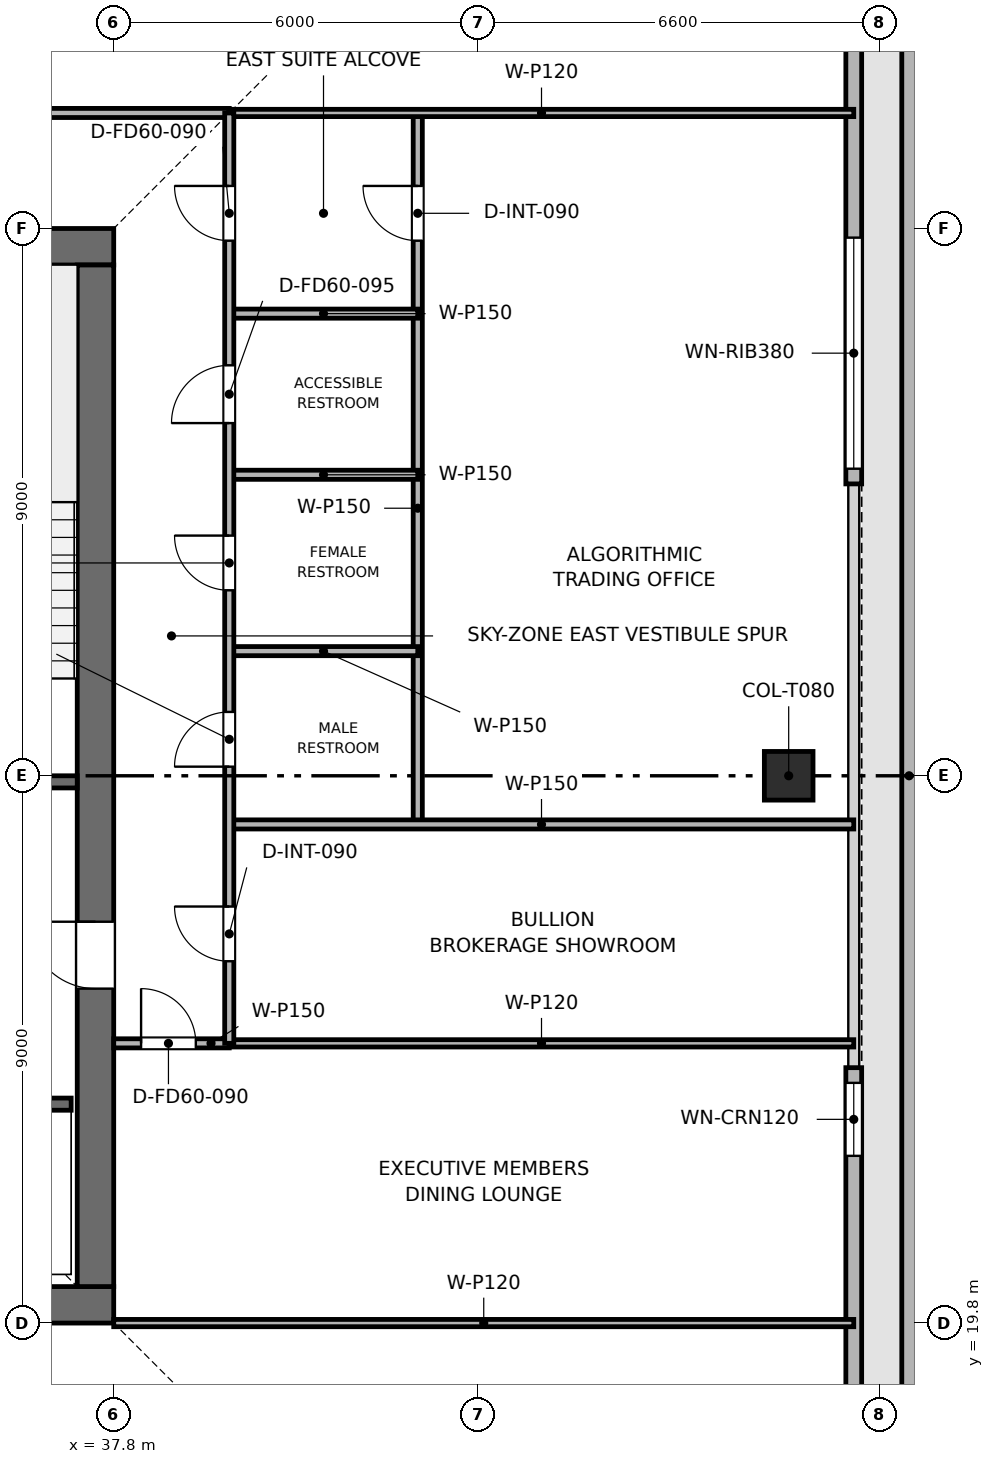
"""IFC4 building model, lengths in metres.
Left out: names, types, materials, properties, quantities, classifications, styles, units other than length and angle.
Written with IfcOpenShell. Run it as: python <this file> out.ifc"""

import sys

from ifc_helpers import new_model, si_unit, direction, frame, frame_2d, origin, origin_2d, place, context, subcontext, project, spatial, rectangle, extrude, element, fill, save


model = new_model("IFC4")
c1 = context("Model", 3, precision=1e-05, world=origin(), true_north=direction((0.0, 1.0)))
c2 = subcontext(c1, "Body", "Model", "MODEL_VIEW")
j1 = project(units=[si_unit("LENGTHUNIT", "METRE"), si_unit("PLANEANGLEUNIT", "RADIAN")], contexts=[c1])
p1 = place(None, origin())
s1 = spatial("IfcSite", under=j1, at=p1, CompositionType="ELEMENT")
p2 = place(p1, origin())
s2 = spatial("IfcBuilding", under=s1, at=p2, CompositionType="ELEMENT")
p3 = place(p2, frame((0.0, 0.0, 344.25)))
s3 = spatial("IfcBuildingStorey", under=s2, at=p3, CompositionType="ELEMENT", Elevation=344.25)
p4 = place(p3, frame((19.8, 20.1, 0.0), z_axis=(0.0, 0.0, 1.0), x_axis=(1.0, 0.0, 0.0)))
e1 = element("IfcWall", 1, at=p4, inside=s3, PredefinedType="SHEAR", context=c2, shape_type="SweptSolid", body=[
    extrude(rectangle(XDim=18.0, YDim=0.6, at=frame_2d((9.0, 0.0))), origin(), (0.0, 0.0, 1.0), 3.75),
])
p5 = place(p3, frame((19.8, 37.5, 0.0), z_axis=(0.0, 0.0, 1.0), x_axis=(1.0, 0.0, 0.0)))
e2 = element("IfcWall", 2, at=p5, inside=s3, PredefinedType="SHEAR", context=c2, shape_type="SweptSolid", body=[
    extrude(rectangle(XDim=18.0, YDim=0.6, at=frame_2d((9.0, 0.0))), origin(), (0.0, 0.0, 1.0), 3.75),
])
p6 = place(p5, frame((7.05, 0.0, 0.0)))
e3 = element("IfcOpeningElement", 3, at=p6, cuts=e2, PredefinedType="OPENING", context=c2, shape_type="SweptSolid", body=[
    extrude(rectangle(XDim=1.1, YDim=2.15, at=frame_2d((0.55, 1.075))), frame((0.0, 0.31, 0.0), z_axis=(0.0, -1.0, 0.0), x_axis=(1.0, 0.0, 0.0)), (0.0, 0.0, 1.0), 0.62),
])
p7 = place(p3, frame((37.5, 20.4, 0.0), z_axis=(0.0, 0.0, 1.0), x_axis=(0.0, 1.0, 0.0)))
e4 = element("IfcWall", 4, at=p7, inside=s3, PredefinedType="SHEAR", context=c2, shape_type="SweptSolid", body=[
    extrude(rectangle(XDim=16.8, YDim=0.6, at=frame_2d((8.4, 0.0))), origin(), (0.0, 0.0, 1.0), 3.75),
])
p8 = place(p7, frame((4.9, 0.0, 0.0)))
e5 = element("IfcOpeningElement", 5, at=p8, cuts=e4, PredefinedType="OPENING", context=c2, shape_type="SweptSolid", body=[
    extrude(rectangle(XDim=1.1, YDim=2.15, at=frame_2d((0.55, 1.075))), frame((0.0, 0.31, 0.0), z_axis=(0.0, -1.0, 0.0), x_axis=(1.0, 0.0, 0.0)), (0.0, 0.0, 1.0), 0.62),
])
p9 = place(p3, frame((48.9, 28.8, 0.003), z_axis=(0.0, 0.0, 1.0), x_axis=(1.0, 0.0, 0.0)))
e6 = element("IfcColumn", 6, at=p9, inside=s3, PredefinedType="COLUMN", context=c2, shape_type="SweptSolid", body=[
    extrude(rectangle(XDim=0.8, YDim=0.8, at=origin_2d()), origin(), (0.0, 0.0, 1.0), 3.504),
])
p10 = place(p3, frame((50.88, 12.855, 0.0), z_axis=(0.0, 0.0, 1.0), x_axis=(0.0, 1.0, 0.0)))
e7 = element("IfcWall", 7, at=p10, inside=s3, PredefinedType="PARAPET", context=c2, shape_type="SweptSolid", body=[
    extrude(rectangle(XDim=31.89, YDim=0.24, at=frame_2d((15.945, 0.0))), origin(), (0.0, 0.0, 1.0), 1.2),
])
p11 = place(p3, frame((49.97, 44.3, 0.0), z_axis=(0.0, 0.0, 1.0), x_axis=(0.0, -1.0, 0.0)))
e8 = element("IfcWall", 8, at=p11, inside=s3, PredefinedType="SOLIDWALL", context=c2, shape_type="SweptSolid", body=[
    extrude(rectangle(XDim=10.7, YDim=0.26, at=frame_2d((5.35, 0.0))), origin(), (0.0, 0.0, 1.0), 3.51),
])
p12 = place(p11, frame((6.65, 0.0, 0.9)))
e9 = element("IfcOpeningElement", 9, at=p12, cuts=e8, PredefinedType="OPENING", context=c2, shape_type="SweptSolid", body=[
    extrude(rectangle(XDim=3.8, YDim=1.9, at=frame_2d((1.9, 0.95))), frame((0.0, 0.14, 0.0), z_axis=(0.0, -1.0, 0.0), x_axis=(1.0, 0.0, 0.0)), (0.0, 0.0, 1.0), 0.28),
])
p13 = place(p3, frame((49.97, 24.0, 0.0), z_axis=(0.0, 0.0, 1.0), x_axis=(0.0, -1.0, 0.0)))
e10 = element("IfcWall", 10, at=p13, inside=s3, PredefinedType="SOLIDWALL", context=c2, shape_type="SweptSolid", body=[
    extrude(rectangle(XDim=10.7, YDim=0.26, at=frame_2d((5.35, 0.0))), origin(), (0.0, 0.0, 1.0), 3.51),
])
p14 = place(p13, frame((0.25, 0.0, 0.9)))
e11 = element("IfcOpeningElement", 11, at=p14, cuts=e10, PredefinedType="OPENING", context=c2, shape_type="SweptSolid", body=[
    extrude(rectangle(XDim=1.2, YDim=2.1, at=frame_2d((0.6, 1.05))), frame((0.0, 0.14, 0.0), z_axis=(0.0, -1.0, 0.0), x_axis=(1.0, 0.0, 0.0)), (0.0, 0.0, 1.0), 0.28),
])
p15 = place(p3, frame((34.05, 28.7, 0.0), z_axis=(0.0, 0.0, 1.0), x_axis=(1.0, 0.0, 0.0)))
e12 = element("IfcWall", 12, at=p15, inside=s3, PredefinedType="SHEAR", context=c2, shape_type="SweptSolid", body=[
    extrude(rectangle(XDim=3.15, YDim=0.2, at=frame_2d((1.575, 0.0))), origin(), (0.0, 0.0, 1.0), 3.51),
])
p16 = place(p15, frame((0.8, 0.0, 0.0)))
e13 = element("IfcOpeningElement", 13, at=p16, cuts=e12, PredefinedType="OPENING", context=c2, shape_type="SweptSolid", body=[
    extrude(rectangle(XDim=1.0, YDim=2.1, at=frame_2d((0.5, 1.05))), frame((0.0, 0.11, 0.0), z_axis=(0.0, -1.0, 0.0), x_axis=(1.0, 0.0, 0.0)), (0.0, 0.0, 1.0), 0.22),
])
p17 = place(p3, frame((34.05, 23.4, 0.0), z_axis=(0.0, 0.0, 1.0), x_axis=(1.0, 0.0, 0.0)))
e14 = element("IfcWall", 14, at=p17, inside=s3, PredefinedType="SHEAR", context=c2, shape_type="SweptSolid", body=[
    extrude(rectangle(XDim=3.05, YDim=0.2, at=frame_2d((1.525, 0.0))), origin(), (0.0, 0.0, 1.0), 3.51),
])
p18 = place(p17, frame((1.2, 0.0, 0.0)))
e15 = element("IfcOpeningElement", 15, at=p18, cuts=e14, PredefinedType="OPENING", context=c2, shape_type="SweptSolid", body=[
    extrude(rectangle(XDim=1.1, YDim=2.15, at=frame_2d((0.55, 1.075))), frame((0.0, 0.11, 0.0), z_axis=(0.0, -1.0, 0.0), x_axis=(1.0, 0.0, 0.0)), (0.0, 0.0, 1.0), 0.22),
])
p19 = place(p3, frame((37.8, 19.8, 0.0), z_axis=(0.0, 0.0, 1.0), x_axis=(1.0, 0.0, 0.0)))
e16 = element("IfcWall", 16, at=p19, inside=s3, PredefinedType="PARTITIONING", context=c2, shape_type="SweptSolid", body=[
    extrude(rectangle(XDim=12.17, YDim=0.12, at=frame_2d((6.085, 0.0))), origin(), (0.0, 0.0, 1.0), 3.095),
])
p20 = place(p3, frame((37.8, 24.4, 0.0), z_axis=(0.0, 0.0, 1.0), x_axis=(1.0, 0.0, 0.0)))
e17 = element("IfcWall", 17, at=p20, inside=s3, PredefinedType="PARTITIONING", context=c2, shape_type="SweptSolid", body=[
    extrude(rectangle(XDim=1.9, YDim=0.15, at=frame_2d((0.95, 0.0))), origin(), (0.0, 0.0, 1.0), 3.51),
])
p21 = place(p20, frame((0.45, 0.0, 0.0)))
e18 = element("IfcOpeningElement", 18, at=p21, cuts=e17, PredefinedType="OPENING", context=c2, shape_type="SweptSolid", body=[
    extrude(rectangle(XDim=0.9, YDim=2.1, at=frame_2d((0.45, 1.05))), frame((0.0, 0.085, 0.0), z_axis=(0.0, -1.0, 0.0), x_axis=(1.0, 0.0, 0.0)), (0.0, 0.0, 1.0), 0.17),
])
p22 = place(p3, frame((39.7, 24.4, 0.0), z_axis=(0.0, 0.0, 1.0), x_axis=(1.0, 0.0, 0.0)))
e19 = element("IfcWall", 19, at=p22, inside=s3, PredefinedType="PARTITIONING", context=c2, shape_type="SweptSolid", body=[
    extrude(rectangle(XDim=10.27, YDim=0.12, at=frame_2d((5.135, 0.0))), origin(), (0.0, 0.0, 1.0), 3.135),
])
p23 = place(p3, frame((42.8, 28.0, 0.0), z_axis=(0.0, 0.0, 1.0), x_axis=(0.0, 1.0, 0.0)))
e20 = element("IfcWall", 20, at=p23, inside=s3, PredefinedType="PARTITIONING", context=c2, shape_type="SweptSolid", body=[
    extrude(rectangle(XDim=11.7, YDim=0.15, at=frame_2d((5.85, 0.0))), origin(), (0.0, 0.0, 1.0), 3.095),
])
p24 = place(p23, frame((9.6, 0.0, 0.0)))
e21 = element("IfcOpeningElement", 21, at=p24, cuts=e20, PredefinedType="OPENING", context=c2, shape_type="SweptSolid", body=[
    extrude(rectangle(XDim=0.9, YDim=2.1, at=frame_2d((0.45, 1.05))), frame((0.0, 0.085, 0.0), z_axis=(0.0, -1.0, 0.0), x_axis=(1.0, 0.0, 0.0)), (0.0, 0.0, 1.0), 0.17),
])
p25 = place(p3, frame((39.7, 28.0, 0.0), z_axis=(0.0, 0.0, 1.0), x_axis=(1.0, 0.0, 0.0)))
e22 = element("IfcWall", 22, at=p25, inside=s3, PredefinedType="PARTITIONING", context=c2, shape_type="SweptSolid", body=[
    extrude(rectangle(XDim=10.27, YDim=0.15, at=frame_2d((5.135, 0.0))), origin(), (0.0, 0.0, 1.0), 3.135),
])
for number, where, z_axis, x_axis in (
    (23, (39.7, 36.4, 0.0), (0.0, 0.0, 1.0), (1.0, 0.0, 0.0)),
    (24, (39.7, 30.85, 0.0), (0.0, 0.0, 1.0), (1.0, 0.0, 0.0)),
    (25, (39.7, 33.75, 0.0), (0.0, 0.0, 1.0), (1.0, 0.0, 0.0)),
):
    element("IfcWall", number, at=place(p3, frame(where, z_axis=z_axis, x_axis=x_axis)), inside=s3, PredefinedType="PARTITIONING", context=c2, shape_type="SweptSolid", body=[
        extrude(rectangle(XDim=3.1, YDim=0.15, at=frame_2d((1.55, 0.0))), origin(), (0.0, 0.0, 1.0), 3.135),
    ])
p26 = place(p3, frame((39.7, 39.7, 0.0), z_axis=(0.0, 0.0, 1.0), x_axis=(1.0, 0.0, 0.0)))
e26 = element("IfcWall", 26, at=p26, inside=s3, PredefinedType="PARTITIONING", context=c2, shape_type="SweptSolid", body=[
    extrude(rectangle(XDim=10.27, YDim=0.12, at=frame_2d((5.135, 0.0))), origin(), (0.0, 0.0, 1.0), 3.095),
])
p27 = place(p3, frame((17.9, 39.7, 0.0), z_axis=(0.0, 0.0, 1.0), x_axis=(1.0, 0.0, 0.0)))
e27 = element("IfcWall", 27, at=p27, inside=s3, PredefinedType="PARTITIONING", context=c2, shape_type="SweptSolid", body=[
    extrude(rectangle(XDim=21.8, YDim=0.15, at=frame_2d((10.9, 0.0))), origin(), (0.0, 0.0, 1.0), 3.095),
])
p28 = place(p27, frame((0.765, 0.0, 0.0)))
e28 = element("IfcOpeningElement", 28, at=p28, cuts=e27, PredefinedType="OPENING", context=c2, shape_type="SweptSolid", body=[
    extrude(rectangle(XDim=0.9, YDim=2.1, at=frame_2d((0.45, 1.05))), frame((0.0, 0.085, 0.0), z_axis=(0.0, -1.0, 0.0), x_axis=(1.0, 0.0, 0.0)), (0.0, 0.0, 1.0), 0.17),
])
p29 = place(p27, frame((6.195, 0.0, 0.0)))
e29 = element("IfcOpeningElement", 29, at=p29, cuts=e27, PredefinedType="OPENING", context=c2, shape_type="SweptSolid", body=[
    extrude(rectangle(XDim=0.9, YDim=2.1, at=frame_2d((0.45, 1.05))), frame((0.0, 0.085, 0.0), z_axis=(0.0, -1.0, 0.0), x_axis=(1.0, 0.0, 0.0)), (0.0, 0.0, 1.0), 0.17),
])
p30 = place(p27, frame((15.88, 0.0, 0.0)))
e30 = element("IfcOpeningElement", 30, at=p30, cuts=e27, PredefinedType="OPENING", context=c2, shape_type="SweptSolid", body=[
    extrude(rectangle(XDim=0.9, YDim=2.1, at=frame_2d((0.45, 1.05))), frame((0.0, 0.085, 0.0), z_axis=(0.0, -1.0, 0.0), x_axis=(1.0, 0.0, 0.0)), (0.0, 0.0, 1.0), 0.17),
])
p31 = place(p3, frame((39.7, 24.4, 0.0), z_axis=(0.0, 0.0, 1.0), x_axis=(0.0, 1.0, 0.0)))
e31 = element("IfcWall", 31, at=p31, inside=s3, PredefinedType="PARTITIONING", context=c2, shape_type="SweptSolid", body=[
    extrude(rectangle(XDim=15.3, YDim=0.15, at=frame_2d((7.65, 0.0))), origin(), (0.0, 0.0, 1.0), 3.095),
])
p32 = place(p31, frame((1.35, 0.0, 0.0)))
e32 = element("IfcOpeningElement", 32, at=p32, cuts=e31, PredefinedType="OPENING", context=c2, shape_type="SweptSolid", body=[
    extrude(rectangle(XDim=0.9, YDim=2.1, at=frame_2d((0.45, 1.05))), frame((0.0, 0.085, 0.0), z_axis=(0.0, -1.0, 0.0), x_axis=(1.0, 0.0, 0.0)), (0.0, 0.0, 1.0), 0.17),
])
p33 = place(p31, frame((4.55, 0.0, 0.0)))
e33 = element("IfcOpeningElement", 33, at=p33, cuts=e31, PredefinedType="OPENING", context=c2, shape_type="SweptSolid", body=[
    extrude(rectangle(XDim=0.9, YDim=2.1, at=frame_2d((0.45, 1.05))), frame((0.0, 0.085, 0.0), z_axis=(0.0, -1.0, 0.0), x_axis=(1.0, 0.0, 0.0)), (0.0, 0.0, 1.0), 0.17),
])
p34 = place(p31, frame((7.45, 0.0, 0.0)))
e34 = element("IfcOpeningElement", 34, at=p34, cuts=e31, PredefinedType="OPENING", context=c2, shape_type="SweptSolid", body=[
    extrude(rectangle(XDim=0.9, YDim=2.1, at=frame_2d((0.45, 1.05))), frame((0.0, 0.085, 0.0), z_axis=(0.0, -1.0, 0.0), x_axis=(1.0, 0.0, 0.0)), (0.0, 0.0, 1.0), 0.17),
])
p35 = place(p31, frame((10.2, 0.0, 0.0)))
e35 = element("IfcOpeningElement", 35, at=p35, cuts=e31, PredefinedType="OPENING", context=c2, shape_type="SweptSolid", body=[
    extrude(rectangle(XDim=0.95, YDim=2.1, at=frame_2d((0.475, 1.05))), frame((0.0, 0.085, 0.0), z_axis=(0.0, -1.0, 0.0), x_axis=(1.0, 0.0, 0.0)), (0.0, 0.0, 1.0), 0.17),
])
p36 = place(p31, frame((13.2, 0.0, 0.0)))
e36 = element("IfcOpeningElement", 36, at=p36, cuts=e31, PredefinedType="OPENING", context=c2, shape_type="SweptSolid", body=[
    extrude(rectangle(XDim=0.9, YDim=2.1, at=frame_2d((0.45, 1.05))), frame((0.0, 0.085, 0.0), z_axis=(0.0, -1.0, 0.0), x_axis=(1.0, 0.0, 0.0)), (0.0, 0.0, 1.0), 0.17),
])
p37 = place(p12, origin())
e37 = element("IfcWindow", 37, at=p37, inside=s3, PartitioningType="SINGLE_PANEL", PredefinedType="WINDOW", context=c2, shape_type="SweptSolid", body=[
    extrude(rectangle(XDim=3.8, YDim=1.9, at=frame_2d((1.9, 0.95))), frame((0.0, 0.03, 0.0), z_axis=(0.0, -1.0, 0.0), x_axis=(1.0, 0.0, 0.0)), (0.0, 0.0, 1.0), 0.06),
])
fill(e9, e37)
p38 = place(p14, origin())
e38 = element("IfcWindow", 38, at=p38, inside=s3, PartitioningType="SINGLE_PANEL", PredefinedType="WINDOW", context=c2, shape_type="SweptSolid", body=[
    extrude(rectangle(XDim=1.2, YDim=2.1, at=frame_2d((0.6, 1.05))), frame((0.0, 0.03, 0.0), z_axis=(0.0, -1.0, 0.0), x_axis=(1.0, 0.0, 0.0)), (0.0, 0.0, 1.0), 0.06),
])
fill(e11, e38)
p39 = place(p21, origin())
e39 = element("IfcDoor", 39, at=p39, inside=s3, OperationType="SINGLE_SWING_LEFT", PredefinedType="DOOR", context=c2, shape_type="SweptSolid", body=[
    extrude(rectangle(XDim=0.9, YDim=2.1, at=frame_2d((0.45, 1.05))), frame((0.0, 0.025, 0.0), z_axis=(0.0, -1.0, 0.0), x_axis=(1.0, 0.0, 0.0)), (0.0, 0.0, 1.0), 0.05),
])
fill(e18, e39)
p40 = place(p24, origin())
e40 = element("IfcDoor", 40, at=p40, inside=s3, OperationType="SINGLE_SWING_RIGHT", PredefinedType="DOOR", context=c2, shape_type="SweptSolid", body=[
    extrude(rectangle(XDim=0.9, YDim=2.1, at=frame_2d((0.45, 1.05))), frame((0.0, 0.025, 0.0), z_axis=(0.0, -1.0, 0.0), x_axis=(1.0, 0.0, 0.0)), (0.0, 0.0, 1.0), 0.05),
])
fill(e21, e40)
p41 = place(p32, origin())
e41 = element("IfcDoor", 41, at=p41, inside=s3, OperationType="SINGLE_SWING_RIGHT", PredefinedType="DOOR", context=c2, shape_type="SweptSolid", body=[
    extrude(rectangle(XDim=0.9, YDim=2.1, at=frame_2d((0.45, 1.05))), frame((0.0, 0.025, 0.0), z_axis=(0.0, -1.0, 0.0), x_axis=(1.0, 0.0, 0.0)), (0.0, 0.0, 1.0), 0.05),
])
fill(e32, e41)
p42 = place(p33, origin())
e42 = element("IfcDoor", 42, at=p42, inside=s3, OperationType="SINGLE_SWING_LEFT", PredefinedType="DOOR", context=c2, shape_type="SweptSolid", body=[
    extrude(rectangle(XDim=0.9, YDim=2.1, at=frame_2d((0.45, 1.05))), frame((0.0, 0.025, 0.0), z_axis=(0.0, -1.0, 0.0), x_axis=(1.0, 0.0, 0.0)), (0.0, 0.0, 1.0), 0.05),
])
fill(e33, e42)
p43 = place(p34, origin())
e43 = element("IfcDoor", 43, at=p43, inside=s3, OperationType="SINGLE_SWING_RIGHT", PredefinedType="DOOR", context=c2, shape_type="SweptSolid", body=[
    extrude(rectangle(XDim=0.9, YDim=2.1, at=frame_2d((0.45, 1.05))), frame((0.0, 0.025, 0.0), z_axis=(0.0, -1.0, 0.0), x_axis=(1.0, 0.0, 0.0)), (0.0, 0.0, 1.0), 0.05),
])
fill(e34, e43)
p44 = place(p35, origin())
e44 = element("IfcDoor", 44, at=p44, inside=s3, OperationType="SINGLE_SWING_LEFT", PredefinedType="DOOR", context=c2, shape_type="SweptSolid", body=[
    extrude(rectangle(XDim=0.95, YDim=2.1, at=frame_2d((0.475, 1.05))), frame((0.0, 0.025, 0.0), z_axis=(0.0, -1.0, 0.0), x_axis=(1.0, 0.0, 0.0)), (0.0, 0.0, 1.0), 0.05),
])
fill(e35, e44)
p45 = place(p36, origin())
e45 = element("IfcDoor", 45, at=p45, inside=s3, OperationType="SINGLE_SWING_RIGHT", PredefinedType="DOOR", context=c2, shape_type="SweptSolid", body=[
    extrude(rectangle(XDim=0.9, YDim=2.1, at=frame_2d((0.45, 1.05))), frame((0.0, 0.025, 0.0), z_axis=(0.0, -1.0, 0.0), x_axis=(1.0, 0.0, 0.0)), (0.0, 0.0, 1.0), 0.05),
])
fill(e36, e45)
p46 = place(p8, origin())
e46 = element("IfcDoor", 46, at=p46, inside=s3, OperationType="SINGLE_SWING_RIGHT", PredefinedType="DOOR", context=c2, shape_type="SweptSolid", body=[
    extrude(rectangle(XDim=1.1, YDim=2.15, at=frame_2d((0.55, 1.075))), frame((0.0, 0.025, 0.0), z_axis=(0.0, -1.0, 0.0), x_axis=(1.0, 0.0, 0.0)), (0.0, 0.0, 1.0), 0.05),
])
fill(e5, e46)
save(model, sys.argv[1])
